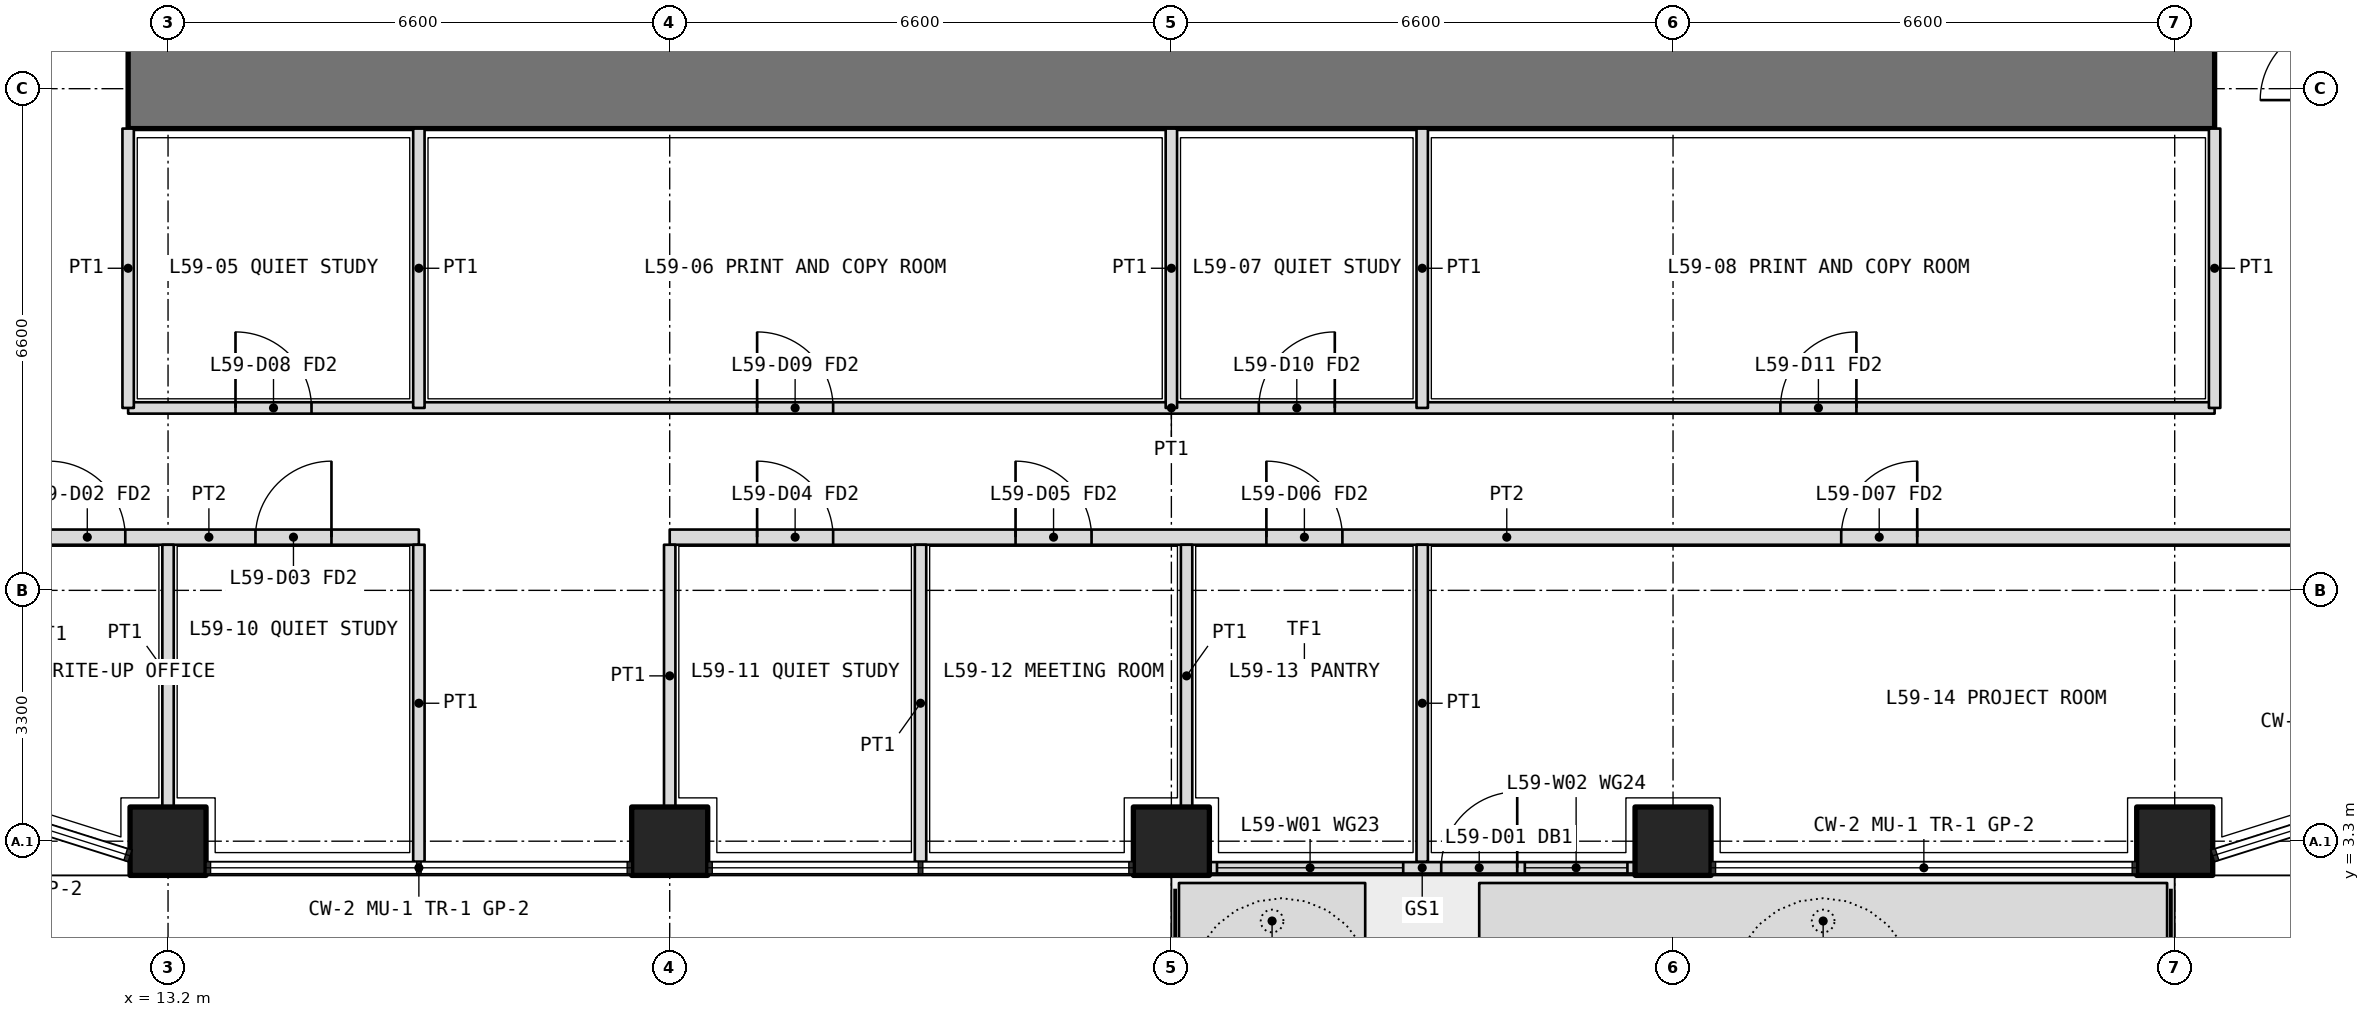
"""IFC4 building model, lengths in metres.
Left out: names, types, materials, properties, quantities, classifications, styles, units other than length and angle.
Written with IfcOpenShell. Run it as: python <this file> out.ifc"""

import sys

from ifc_helpers import new_model, si_unit, direction, frame, frame_2d, origin, origin_2d, place, context, subcontext, project, spatial, polyline, rectangle, outline, extrude, element, fill, save


model = new_model("IFC4")
c1 = context("Model", 3, precision=1e-05, world=origin(), true_north=direction((0.0, 1.0)))
c2 = subcontext(c1, "Body", "Model", "MODEL_VIEW")
j1 = project(units=[si_unit("LENGTHUNIT", "METRE"), si_unit("PLANEANGLEUNIT", "RADIAN")], contexts=[c1])
p1 = place(None, origin())
s1 = spatial("IfcSite", under=j1, at=p1, CompositionType="ELEMENT")
p2 = place(p1, origin())
s2 = spatial("IfcBuilding", under=s1, at=p2, CompositionType="ELEMENT")
p3 = place(p2, frame((0.0, 0.0, 258.6)))
s3 = spatial("IfcBuildingStorey", under=s2, at=p3, CompositionType="ELEMENT", Elevation=258.6)
for number, where, z_axis, x_axis in (
    (1, (13.2, 3.3, 0.0), (0.0, 0.0, 1.0), (1.0, 0.0, 0.0)),
    (2, (19.8, 3.3, 0.0), (0.0, 0.0, 1.0), (1.0, 0.0, 0.0)),
    (3, (26.4, 3.3, 0.0), (0.0, 0.0, 1.0), (1.0, 0.0, 0.0)),
    (4, (33.0, 3.3, 0.0), (0.0, 0.0, 1.0), (1.0, 0.0, 0.0)),
    (5, (39.6, 3.3, 0.0), (0.0, 0.0, 1.0), (1.0, 0.0, 0.0)),
):
    element("IfcColumn", number, at=place(p3, frame(where, z_axis=z_axis, x_axis=x_axis)), inside=s3, PredefinedType="COLUMN", context=c2, shape_type="SweptSolid", body=[
        extrude(rectangle(XDim=1.0, YDim=0.9, at=origin_2d()), origin(), (0.0, 0.0, 1.0), 4.2),
    ])
p4 = place(p3, origin())
e6 = element("IfcWall", 6, at=p4, inside=s3, PredefinedType="USERDEFINED", context=c2, shape_type="SweptSolid", body=[
    extrude(outline(polyline([(26.5, 1.75), (28.95, 1.75), (28.95, 2.75), (26.5, 2.75), (26.5, 1.75)]), holes=[polyline([(26.65, 1.9), (28.8, 1.9), (28.8, 2.6), (26.65, 2.6), (26.65, 1.9)])]), origin(), (0.0, 0.0, 1.0), 1.05),
])
p5 = place(p3, origin())
e7 = element("IfcWall", 7, at=p5, inside=s3, PredefinedType="USERDEFINED", context=c2, shape_type="SweptSolid", body=[
    extrude(outline(polyline([(30.45, 1.75), (39.5, 1.75), (39.5, 2.75), (30.45, 2.75), (30.45, 1.75)]), holes=[polyline([(30.6, 1.9), (39.35, 1.9), (39.35, 2.6), (30.6, 2.6), (30.6, 1.9)])]), origin(), (0.0, 0.0, 1.0), 1.05),
])
p6 = place(p3, frame((26.9, 2.95, 0.0), z_axis=(0.0, 0.0, 1.0), x_axis=(1.0, 0.0, 0.0)))
e8 = element("IfcWall", 8, at=p6, inside=s3, PredefinedType="SOLIDWALL", context=c2, shape_type="SweptSolid", body=[
    extrude(rectangle(XDim=5.6, YDim=0.15, at=frame_2d((2.8, 0.0))), origin(), (0.0, 0.0, 1.0), 2.7),
])
p7 = place(p6, frame((3.05, 0.0, 0.0)))
e9 = element("IfcOpeningElement", 9, at=p7, cuts=e8, PredefinedType="OPENING", context=c2, shape_type="SweptSolid", body=[
    extrude(rectangle(XDim=1.0, YDim=2.4, at=frame_2d((0.5, 1.2))), frame((0.0, 0.085, 0.0), z_axis=(0.0, -1.0, 0.0), x_axis=(1.0, 0.0, 0.0)), (0.0, 0.0, 1.0), 0.17),
])
p8 = place(p6, frame((0.1, 0.0, 0.1)))
e10 = element("IfcOpeningElement", 10, at=p8, cuts=e8, PredefinedType="OPENING", context=c2, shape_type="SweptSolid", body=[
    extrude(rectangle(XDim=2.45, YDim=2.3, at=frame_2d((1.225, 1.15))), frame((0.0, 0.085, 0.0), z_axis=(0.0, -1.0, 0.0), x_axis=(1.0, 0.0, 0.0)), (0.0, 0.0, 1.0), 0.17),
])
p9 = place(p6, frame((4.15, 0.0, 0.1)))
e11 = element("IfcOpeningElement", 11, at=p9, cuts=e8, PredefinedType="OPENING", context=c2, shape_type="SweptSolid", body=[
    extrude(rectangle(XDim=1.35, YDim=2.3, at=frame_2d((0.675, 1.15))), frame((0.0, 0.085, 0.0), z_axis=(0.0, -1.0, 0.0), x_axis=(1.0, 0.0, 0.0)), (0.0, 0.0, 1.0), 0.17),
])
p10 = place(p3, frame((12.675, 13.2, 0.0), z_axis=(0.0, 0.0, 1.0), x_axis=(1.0, 0.0, 0.0)))
e12 = element("IfcWall", 12, at=p10, inside=s3, PredefinedType="SHEAR", context=c2, shape_type="SweptSolid", body=[
    extrude(rectangle(XDim=27.45, YDim=1.05, at=frame_2d((13.725, 0.0))), origin(), (0.0, 0.0, 1.0), 4.2),
])
p11 = place(p3, frame((12.675, 9.0, 0.0), z_axis=(0.0, 0.0, 1.0), x_axis=(1.0, 0.0, 0.0)))
e13 = element("IfcWall", 13, at=p11, inside=s3, PredefinedType="PARTITIONING", context=c2, shape_type="SweptSolid", body=[
    extrude(rectangle(XDim=27.45, YDim=0.15, at=frame_2d((13.725, 0.0))), origin(), (0.0, 0.0, 1.0), 3.0),
])
p12 = place(p11, frame((1.413, 0.0, 0.0)))
e14 = element("IfcOpeningElement", 14, at=p12, cuts=e13, PredefinedType="OPENING", context=c2, shape_type="SweptSolid", body=[
    extrude(rectangle(XDim=1.0, YDim=2.1, at=frame_2d((0.5, 1.05))), frame((0.0, 0.085, 0.0), z_axis=(0.0, -1.0, 0.0), x_axis=(1.0, 0.0, 0.0)), (0.0, 0.0, 1.0), 0.17),
])
p13 = place(p11, frame((8.275, 0.0, 0.0)))
e15 = element("IfcOpeningElement", 15, at=p13, cuts=e13, PredefinedType="OPENING", context=c2, shape_type="SweptSolid", body=[
    extrude(rectangle(XDim=1.0, YDim=2.1, at=frame_2d((0.5, 1.05))), frame((0.0, 0.085, 0.0), z_axis=(0.0, -1.0, 0.0), x_axis=(1.0, 0.0, 0.0)), (0.0, 0.0, 1.0), 0.17),
])
p14 = place(p11, frame((14.875, 0.0, 0.0)))
e16 = element("IfcOpeningElement", 16, at=p14, cuts=e13, PredefinedType="OPENING", context=c2, shape_type="SweptSolid", body=[
    extrude(rectangle(XDim=1.0, YDim=2.1, at=frame_2d((0.5, 1.05))), frame((0.0, 0.085, 0.0), z_axis=(0.0, -1.0, 0.0), x_axis=(1.0, 0.0, 0.0)), (0.0, 0.0, 1.0), 0.17),
])
p15 = place(p11, frame((21.738, 0.0, 0.0)))
e17 = element("IfcOpeningElement", 17, at=p15, cuts=e13, PredefinedType="OPENING", context=c2, shape_type="SweptSolid", body=[
    extrude(rectangle(XDim=1.0, YDim=2.1, at=frame_2d((0.5, 1.05))), frame((0.0, 0.085, 0.0), z_axis=(0.0, -1.0, 0.0), x_axis=(1.0, 0.0, 0.0)), (0.0, 0.0, 1.0), 0.17),
])
for number, where, z_axis, x_axis in (
    (18, (12.675, 12.675, 0.0), (0.0, 0.0, 1.0), (0.0, -1.0, 0.0)),
    (19, (40.125, 12.675, 0.0), (0.0, 0.0, 1.0), (0.0, -1.0, 0.0)),
):
    element("IfcWall", number, at=place(p3, frame(where, z_axis=z_axis, x_axis=x_axis)), inside=s3, PredefinedType="PARTITIONING", context=c2, shape_type="SweptSolid", body=[
        extrude(rectangle(XDim=3.675, YDim=0.15, at=frame_2d((1.837, 0.0))), origin(), (0.0, 0.0, 1.0), 3.0),
    ])
p16 = place(p3, frame((16.5, 12.675, 0.0), z_axis=(0.0, 0.0, 1.0), x_axis=(0.0, -1.0, 0.0)))
e20 = element("IfcWall", 20, at=p16, inside=s3, PredefinedType="PARTITIONING", context=c2, shape_type="SweptSolid", body=[
    extrude(rectangle(XDim=3.675, YDim=0.15, at=frame_2d((1.837, 0.0))), origin(), (0.0, 0.0, 1.0), 3.9),
])
p17 = place(p3, frame((26.4, 12.675, 0.0), z_axis=(0.0, 0.0, 1.0), x_axis=(0.0, -1.0, 0.0)))
e21 = element("IfcWall", 21, at=p17, inside=s3, PredefinedType="PARTITIONING", context=c2, shape_type="SweptSolid", body=[
    extrude(rectangle(XDim=3.675, YDim=0.15, at=frame_2d((1.837, 0.0))), origin(), (0.0, 0.0, 1.0), 3.0),
])
p18 = place(p3, frame((29.7, 12.675, 0.0), z_axis=(0.0, 0.0, 1.0), x_axis=(0.0, -1.0, 0.0)))
e22 = element("IfcWall", 22, at=p18, inside=s3, PredefinedType="PARTITIONING", context=c2, shape_type="SweptSolid", body=[
    extrude(rectangle(XDim=3.675, YDim=0.15, at=frame_2d((1.837, 0.0))), origin(), (0.0, 0.0, 1.0), 3.9),
])
p19 = place(p3, frame((10.975, 7.3, 0.0), z_axis=(0.0, 0.0, 1.0), x_axis=(1.0, 0.0, 0.0)))
e23 = element("IfcWall", 23, at=p19, inside=s3, PredefinedType="PARTITIONING", context=c2, shape_type="SweptSolid", body=[
    extrude(rectangle(XDim=5.525, YDim=0.2, at=frame_2d((2.762, 0.0))), origin(), (0.0, 0.0, 1.0), 3.0),
])
p20 = place(p19, frame((0.663, 0.0, 0.0)))
e24 = element("IfcOpeningElement", 24, at=p20, cuts=e23, PredefinedType="OPENING", context=c2, shape_type="SweptSolid", body=[
    extrude(rectangle(XDim=1.0, YDim=2.1, at=frame_2d((0.5, 1.05))), frame((0.0, 0.11, 0.0), z_axis=(0.0, -1.0, 0.0), x_axis=(1.0, 0.0, 0.0)), (0.0, 0.0, 1.0), 0.22),
])
p21 = place(p19, frame((3.375, 0.0, 0.0)))
e25 = element("IfcOpeningElement", 25, at=p21, cuts=e23, PredefinedType="OPENING", context=c2, shape_type="SweptSolid", body=[
    extrude(rectangle(XDim=1.0, YDim=2.1, at=frame_2d((0.5, 1.05))), frame((0.0, 0.11, 0.0), z_axis=(0.0, -1.0, 0.0), x_axis=(1.0, 0.0, 0.0)), (0.0, 0.0, 1.0), 0.22),
])
p22 = place(p3, frame((19.8, 7.3, 0.0), z_axis=(0.0, 0.0, 1.0), x_axis=(1.0, 0.0, 0.0)))
e26 = element("IfcWall", 26, at=p22, inside=s3, PredefinedType="PARTITIONING", context=c2, shape_type="SweptSolid", body=[
    extrude(rectangle(XDim=22.025, YDim=0.2, at=frame_2d((11.012, 0.0))), origin(), (0.0, 0.0, 1.0), 3.0),
])
p23 = place(p22, frame((1.15, 0.0, 0.0)))
e27 = element("IfcOpeningElement", 27, at=p23, cuts=e26, PredefinedType="OPENING", context=c2, shape_type="SweptSolid", body=[
    extrude(rectangle(XDim=1.0, YDim=2.1, at=frame_2d((0.5, 1.05))), frame((0.0, 0.11, 0.0), z_axis=(0.0, -1.0, 0.0), x_axis=(1.0, 0.0, 0.0)), (0.0, 0.0, 1.0), 0.22),
])
p24 = place(p22, frame((4.55, 0.0, 0.0)))
e28 = element("IfcOpeningElement", 28, at=p24, cuts=e26, PredefinedType="OPENING", context=c2, shape_type="SweptSolid", body=[
    extrude(rectangle(XDim=1.0, YDim=2.1, at=frame_2d((0.5, 1.05))), frame((0.0, 0.11, 0.0), z_axis=(0.0, -1.0, 0.0), x_axis=(1.0, 0.0, 0.0)), (0.0, 0.0, 1.0), 0.22),
])
p25 = place(p22, frame((7.85, 0.0, 0.0)))
e29 = element("IfcOpeningElement", 29, at=p25, cuts=e26, PredefinedType="OPENING", context=c2, shape_type="SweptSolid", body=[
    extrude(rectangle(XDim=1.0, YDim=2.1, at=frame_2d((0.5, 1.05))), frame((0.0, 0.11, 0.0), z_axis=(0.0, -1.0, 0.0), x_axis=(1.0, 0.0, 0.0)), (0.0, 0.0, 1.0), 0.22),
])
p26 = place(p22, frame((15.413, 0.0, 0.0)))
e30 = element("IfcOpeningElement", 30, at=p26, cuts=e26, PredefinedType="OPENING", context=c2, shape_type="SweptSolid", body=[
    extrude(rectangle(XDim=1.0, YDim=2.1, at=frame_2d((0.5, 1.05))), frame((0.0, 0.11, 0.0), z_axis=(0.0, -1.0, 0.0), x_axis=(1.0, 0.0, 0.0)), (0.0, 0.0, 1.0), 0.22),
])
p27 = place(p3, frame((26.6, 3.75, 0.0), z_axis=(0.0, 0.0, 1.0), x_axis=(0.0, 1.0, 0.0)))
e31 = element("IfcWall", 31, at=p27, inside=s3, PredefinedType="PARTITIONING", context=c2, shape_type="SweptSolid", body=[
    extrude(rectangle(XDim=3.45, YDim=0.15, at=frame_2d((1.725, 0.0))), origin(), (0.0, 0.0, 1.0), 3.0),
])
p28 = place(p3, frame((29.7, 3.03, 0.0), z_axis=(0.0, 0.0, 1.0), x_axis=(0.0, 1.0, 0.0)))
e32 = element("IfcWall", 32, at=p28, inside=s3, PredefinedType="PARTITIONING", context=c2, shape_type="SweptSolid", body=[
    extrude(rectangle(XDim=4.17, YDim=0.15, at=frame_2d((2.085, 0.0))), origin(), (0.0, 0.0, 1.0), 2.7),
])
p29 = place(p3, frame((13.2, 3.75, 0.0), z_axis=(0.0, 0.0, 1.0), x_axis=(0.0, 1.0, 0.0)))
e33 = element("IfcWall", 33, at=p29, inside=s3, PredefinedType="PARTITIONING", context=c2, shape_type="SweptSolid", body=[
    extrude(rectangle(XDim=3.45, YDim=0.15, at=frame_2d((1.725, 0.0))), origin(), (0.0, 0.0, 1.0), 3.0),
])
p30 = place(p3, frame((16.5, 3.03, 0.0), z_axis=(0.0, 0.0, 1.0), x_axis=(0.0, 1.0, 0.0)))
e34 = element("IfcWall", 34, at=p30, inside=s3, PredefinedType="PARTITIONING", context=c2, shape_type="SweptSolid", body=[
    extrude(rectangle(XDim=4.17, YDim=0.15, at=frame_2d((2.085, 0.0))), origin(), (0.0, 0.0, 1.0), 2.7),
])
p31 = place(p3, frame((19.8, 3.75, 0.0), z_axis=(0.0, 0.0, 1.0), x_axis=(0.0, 1.0, 0.0)))
e35 = element("IfcWall", 35, at=p31, inside=s3, PredefinedType="PARTITIONING", context=c2, shape_type="SweptSolid", body=[
    extrude(rectangle(XDim=3.45, YDim=0.15, at=frame_2d((1.725, 0.0))), origin(), (0.0, 0.0, 1.0), 3.0),
])
p32 = place(p3, frame((23.1, 3.03, 0.0), z_axis=(0.0, 0.0, 1.0), x_axis=(0.0, 1.0, 0.0)))
e36 = element("IfcWall", 36, at=p32, inside=s3, PredefinedType="PARTITIONING", context=c2, shape_type="SweptSolid", body=[
    extrude(rectangle(XDim=4.17, YDim=0.15, at=frame_2d((2.085, 0.0))), origin(), (0.0, 0.0, 1.0), 2.7),
])
p33 = place(p7, origin())
e37 = element("IfcDoor", 37, at=p33, inside=s3, OperationType="SINGLE_SWING_RIGHT", PredefinedType="DOOR", context=c2, shape_type="SweptSolid", body=[
    extrude(rectangle(XDim=1.0, YDim=2.4, at=frame_2d((0.5, 1.2))), frame((0.0, 0.025, 0.0), z_axis=(0.0, -1.0, 0.0), x_axis=(1.0, 0.0, 0.0)), (0.0, 0.0, 1.0), 0.05),
])
fill(e9, e37)
p34 = place(p8, origin())
e38 = element("IfcWindow", 38, at=p34, inside=s3, PartitioningType="SINGLE_PANEL", PredefinedType="WINDOW", context=c2, shape_type="SweptSolid", body=[
    extrude(rectangle(XDim=2.45, YDim=2.3, at=frame_2d((1.225, 1.15))), frame((0.0, 0.03, 0.0), z_axis=(0.0, -1.0, 0.0), x_axis=(1.0, 0.0, 0.0)), (0.0, 0.0, 1.0), 0.06),
])
fill(e10, e38)
p35 = place(p9, origin())
e39 = element("IfcWindow", 39, at=p35, inside=s3, PartitioningType="SINGLE_PANEL", PredefinedType="WINDOW", context=c2, shape_type="SweptSolid", body=[
    extrude(rectangle(XDim=1.35, YDim=2.3, at=frame_2d((0.675, 1.15))), frame((0.0, 0.03, 0.0), z_axis=(0.0, -1.0, 0.0), x_axis=(1.0, 0.0, 0.0)), (0.0, 0.0, 1.0), 0.06),
])
fill(e11, e39)
p36 = place(p12, origin())
e40 = element("IfcDoor", 40, at=p36, inside=s3, OperationType="SINGLE_SWING_LEFT", PredefinedType="DOOR", context=c2, shape_type="SweptSolid", body=[
    extrude(rectangle(XDim=1.0, YDim=2.1, at=frame_2d((0.5, 1.05))), frame((0.0, 0.025, 0.0), z_axis=(0.0, -1.0, 0.0), x_axis=(1.0, 0.0, 0.0)), (0.0, 0.0, 1.0), 0.05),
])
fill(e14, e40)
p37 = place(p13, origin())
e41 = element("IfcDoor", 41, at=p37, inside=s3, OperationType="SINGLE_SWING_LEFT", PredefinedType="DOOR", context=c2, shape_type="SweptSolid", body=[
    extrude(rectangle(XDim=1.0, YDim=2.1, at=frame_2d((0.5, 1.05))), frame((0.0, 0.025, 0.0), z_axis=(0.0, -1.0, 0.0), x_axis=(1.0, 0.0, 0.0)), (0.0, 0.0, 1.0), 0.05),
])
fill(e15, e41)
p38 = place(p14, origin())
e42 = element("IfcDoor", 42, at=p38, inside=s3, OperationType="SINGLE_SWING_RIGHT", PredefinedType="DOOR", context=c2, shape_type="SweptSolid", body=[
    extrude(rectangle(XDim=1.0, YDim=2.1, at=frame_2d((0.5, 1.05))), frame((0.0, 0.025, 0.0), z_axis=(0.0, -1.0, 0.0), x_axis=(1.0, 0.0, 0.0)), (0.0, 0.0, 1.0), 0.05),
])
fill(e16, e42)
p39 = place(p15, origin())
e43 = element("IfcDoor", 43, at=p39, inside=s3, OperationType="SINGLE_SWING_RIGHT", PredefinedType="DOOR", context=c2, shape_type="SweptSolid", body=[
    extrude(rectangle(XDim=1.0, YDim=2.1, at=frame_2d((0.5, 1.05))), frame((0.0, 0.025, 0.0), z_axis=(0.0, -1.0, 0.0), x_axis=(1.0, 0.0, 0.0)), (0.0, 0.0, 1.0), 0.05),
])
fill(e17, e43)
p40 = place(p20, origin())
e44 = element("IfcDoor", 44, at=p40, inside=s3, OperationType="SINGLE_SWING_LEFT", PredefinedType="DOOR", context=c2, shape_type="SweptSolid", body=[
    extrude(rectangle(XDim=1.0, YDim=2.1, at=frame_2d((0.5, 1.05))), frame((0.0, 0.025, 0.0), z_axis=(0.0, -1.0, 0.0), x_axis=(1.0, 0.0, 0.0)), (0.0, 0.0, 1.0), 0.05),
])
fill(e24, e44)
p41 = place(p21, origin())
e45 = element("IfcDoor", 45, at=p41, inside=s3, OperationType="SINGLE_SWING_RIGHT", PredefinedType="DOOR", context=c2, shape_type="SweptSolid", body=[
    extrude(rectangle(XDim=1.0, YDim=2.1, at=frame_2d((0.5, 1.05))), frame((0.0, 0.025, 0.0), z_axis=(0.0, -1.0, 0.0), x_axis=(1.0, 0.0, 0.0)), (0.0, 0.0, 1.0), 0.05),
])
fill(e25, e45)
p42 = place(p23, origin())
e46 = element("IfcDoor", 46, at=p42, inside=s3, OperationType="SINGLE_SWING_LEFT", PredefinedType="DOOR", context=c2, shape_type="SweptSolid", body=[
    extrude(rectangle(XDim=1.0, YDim=2.1, at=frame_2d((0.5, 1.05))), frame((0.0, 0.025, 0.0), z_axis=(0.0, -1.0, 0.0), x_axis=(1.0, 0.0, 0.0)), (0.0, 0.0, 1.0), 0.05),
])
fill(e27, e46)
p43 = place(p24, origin())
e47 = element("IfcDoor", 47, at=p43, inside=s3, OperationType="SINGLE_SWING_LEFT", PredefinedType="DOOR", context=c2, shape_type="SweptSolid", body=[
    extrude(rectangle(XDim=1.0, YDim=2.1, at=frame_2d((0.5, 1.05))), frame((0.0, 0.025, 0.0), z_axis=(0.0, -1.0, 0.0), x_axis=(1.0, 0.0, 0.0)), (0.0, 0.0, 1.0), 0.05),
])
fill(e28, e47)
p44 = place(p25, origin())
e48 = element("IfcDoor", 48, at=p44, inside=s3, OperationType="SINGLE_SWING_LEFT", PredefinedType="DOOR", context=c2, shape_type="SweptSolid", body=[
    extrude(rectangle(XDim=1.0, YDim=2.1, at=frame_2d((0.5, 1.05))), frame((0.0, 0.025, 0.0), z_axis=(0.0, -1.0, 0.0), x_axis=(1.0, 0.0, 0.0)), (0.0, 0.0, 1.0), 0.05),
])
fill(e29, e48)
p45 = place(p26, origin())
e49 = element("IfcDoor", 49, at=p45, inside=s3, OperationType="SINGLE_SWING_RIGHT", PredefinedType="DOOR", context=c2, shape_type="SweptSolid", body=[
    extrude(rectangle(XDim=1.0, YDim=2.1, at=frame_2d((0.5, 1.05))), frame((0.0, 0.025, 0.0), z_axis=(0.0, -1.0, 0.0), x_axis=(1.0, 0.0, 0.0)), (0.0, 0.0, 1.0), 0.05),
])
fill(e30, e49)
save(model, sys.argv[1])
